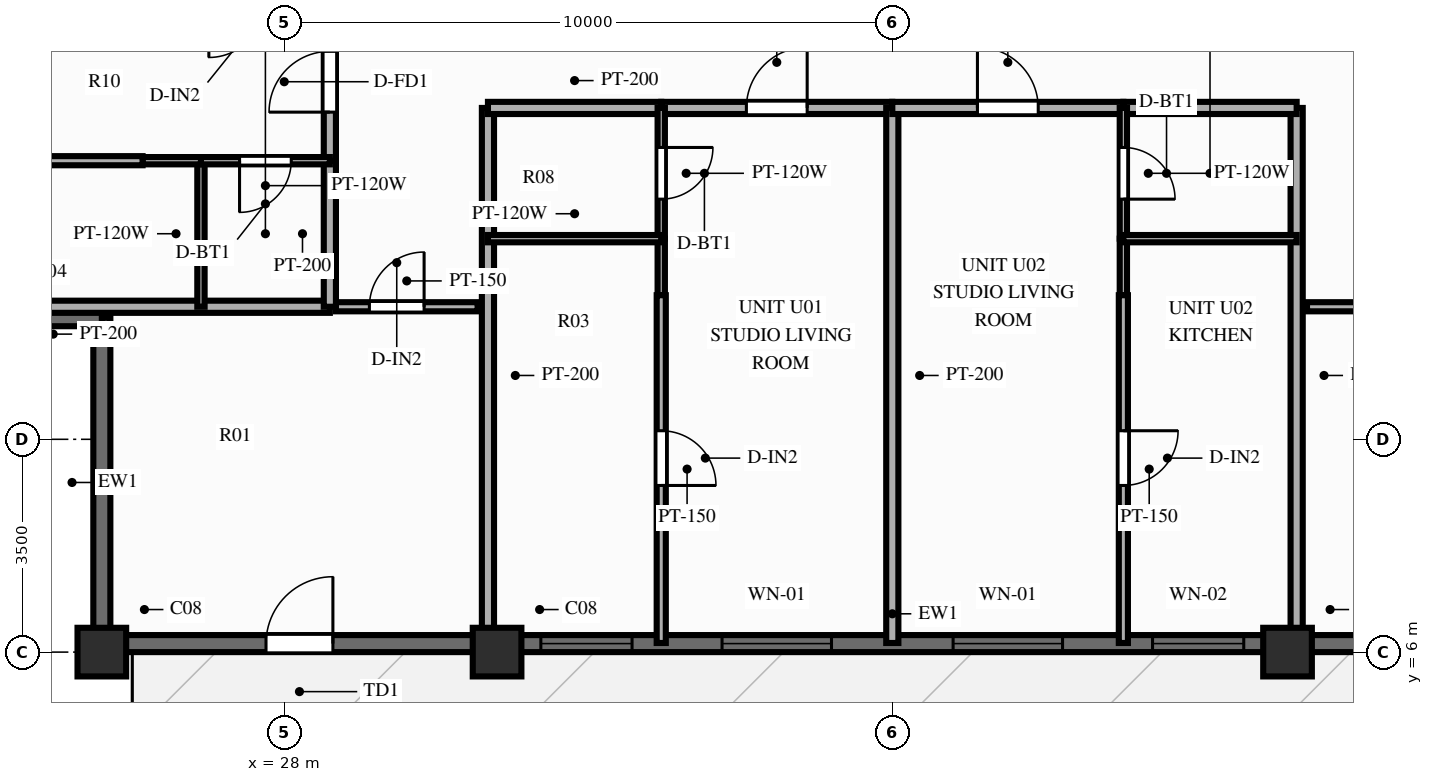
"""IFC4 building model, lengths in metres.
Left out: names, types, materials, properties, quantities, classifications, styles, units other than length and angle.
Written with IfcOpenShell. Run it as: python <this file> out.ifc"""

import sys

from ifc_helpers import new_model, si_unit, direction, frame, frame_2d, origin, origin_2d, place, context, subcontext, project, spatial, rectangle, extrude, source, transform, mapped, element, fill, save


model = new_model("IFC4")
c1 = context("Model", 3, precision=1e-05, world=origin(), true_north=direction((0.0, 1.0)))
c2 = subcontext(c1, "Body", "Model", "MODEL_VIEW")
j1 = project(units=[si_unit("LENGTHUNIT", "METRE"), si_unit("PLANEANGLEUNIT", "RADIAN")], contexts=[c1])
p1 = place(None, origin())
s1 = spatial("IfcSite", under=j1, at=p1, CompositionType="ELEMENT")
p2 = place(p1, origin())
s2 = spatial("IfcBuilding", under=s1, at=p2, CompositionType="ELEMENT")
p3 = place(p2, frame((0.0, 0.0, 202.6)))
s3 = spatial("IfcBuildingStorey", under=s2, at=p3, CompositionType="ELEMENT", Elevation=202.6)
m1 = source(origin(), c2, "Body", "SweptSolid", [
    extrude(rectangle(XDim=0.8, YDim=0.8, at=origin_2d()), origin(), (0.0, 0.0, 1.0), 3.9),
])
for number, where, z_axis, x_axis in (
    (1, (25.0, 6.0, 0.0), (0.0, 0.0, 1.0), (1.0, 0.0, 0.0)),
    (2, (31.5, 6.0, 0.0), (0.0, 0.0, 1.0), (1.0, 0.0, 0.0)),
    (3, (44.5, 6.0, 0.0), (0.0, 0.0, 1.0), (1.0, 0.0, 0.0)),
):
    element("IfcColumn", number, at=place(p3, frame(where, z_axis=z_axis, x_axis=x_axis)), inside=s3, PredefinedType="COLUMN", context=c2, shape_type="MappedRepresentation", body=[
        mapped(m1, transform((0.0, 0.0, 0.0), scale=1.0)),
    ])
p4 = place(p3, frame((25.0, 6.14, 0.0), z_axis=(0.0, 0.0, 1.0), x_axis=(1.0, 0.0, 0.0)))
e4 = element("IfcWall", 4, at=p4, inside=s3, PredefinedType="SOLIDWALL", context=c2, shape_type="SweptSolid", body=[
    extrude(rectangle(XDim=26.0, YDim=0.28, at=frame_2d((13.0, 0.0))), origin(), (0.0, 0.0, 1.0), 2.79),
])
p5 = place(p4, frame((3.8, 0.0, 0.0), z_axis=(0.0, 0.0, 1.0), x_axis=(-1.0, 0.0, 0.0)))
e5 = element("IfcOpeningElement", 5, at=p5, cuts=e4, PredefinedType="OPENING", context=c2, shape_type="SweptSolid", body=[
    extrude(rectangle(XDim=1.1, YDim=2.15, at=frame_2d((0.55, 1.075))), frame((0.0, 0.152, 0.0), z_axis=(0.0, -1.0, 0.0), x_axis=(1.0, 0.0, 0.0)), (0.0, 0.0, 1.0), 0.304),
])
p6 = place(p4, frame((7.22, 0.0, 0.85)))
e6 = element("IfcOpeningElement", 6, at=p6, cuts=e4, PredefinedType="OPENING", context=c2, shape_type="SweptSolid", body=[
    extrude(rectangle(XDim=1.5, YDim=1.65, at=frame_2d((0.75, 0.825))), frame((0.0, 0.152, 0.0), z_axis=(0.0, -1.0, 0.0), x_axis=(1.0, 0.0, 0.0)), (0.0, 0.0, 1.0), 0.304),
])
p7 = place(p4, frame((10.2, 0.0, 0.85)))
e7 = element("IfcOpeningElement", 7, at=p7, cuts=e4, PredefinedType="OPENING", context=c2, shape_type="SweptSolid", body=[
    extrude(rectangle(XDim=1.8, YDim=1.65, at=frame_2d((0.9, 0.825))), frame((0.0, 0.152, 0.0), z_axis=(0.0, -1.0, 0.0), x_axis=(1.0, 0.0, 0.0)), (0.0, 0.0, 1.0), 0.304),
])
p8 = place(p4, frame((14.0, 0.0, 0.85)))
e8 = element("IfcOpeningElement", 8, at=p8, cuts=e4, PredefinedType="OPENING", context=c2, shape_type="SweptSolid", body=[
    extrude(rectangle(XDim=1.8, YDim=1.65, at=frame_2d((0.9, 0.825))), frame((0.0, 0.152, 0.0), z_axis=(0.0, -1.0, 0.0), x_axis=(1.0, 0.0, 0.0)), (0.0, 0.0, 1.0), 0.304),
])
p9 = place(p4, frame((17.28, 0.0, 0.85)))
e9 = element("IfcOpeningElement", 9, at=p9, cuts=e4, PredefinedType="OPENING", context=c2, shape_type="SweptSolid", body=[
    extrude(rectangle(XDim=1.5, YDim=1.65, at=frame_2d((0.75, 0.825))), frame((0.0, 0.152, 0.0), z_axis=(0.0, -1.0, 0.0), x_axis=(1.0, 0.0, 0.0)), (0.0, 0.0, 1.0), 0.304),
])
p10 = place(p4, frame((21.85, 0.0, 0.85)))
e10 = element("IfcOpeningElement", 10, at=p10, cuts=e4, PredefinedType="OPENING", context=c2, shape_type="SweptSolid", body=[
    extrude(rectangle(XDim=1.8, YDim=1.65, at=frame_2d((0.9, 0.825))), frame((0.0, 0.152, 0.0), z_axis=(0.0, -1.0, 0.0), x_axis=(1.0, 0.0, 0.0)), (0.0, 0.0, 1.0), 0.304),
])
for number, where, z_axis, x_axis in (
    (11, (25.0, 6.08, 0.0), (0.0, 0.0, 1.0), (0.0, 1.0, 0.0)),
    (12, (19.58, 11.5, 0.0), (0.0, 0.0, 1.0), (1.0, 0.0, 0.0)),
):
    element("IfcWall", number, at=place(p3, frame(where, z_axis=z_axis, x_axis=x_axis)), inside=s3, PredefinedType="SOLIDWALL", context=c2, shape_type="SweptSolid", body=[
        extrude(rectangle(XDim=5.42, YDim=0.28, at=frame_2d((2.71, 0.0))), origin(), (0.0, 0.0, 1.0), 2.79),
    ])
p11 = place(p3, frame((28.85, 11.68, 0.0), z_axis=(0.0, 0.0, 1.0), x_axis=(1.0, 0.0, 0.0)))
e13 = element("IfcWall", 13, at=p11, inside=s3, PredefinedType="PARTITIONING", context=c2, shape_type="SweptSolid", body=[
    extrude(rectangle(XDim=2.33, YDim=0.15, at=frame_2d((1.165, 0.0))), origin(), (0.0, 0.0, 1.0), 3.6),
])
p12 = place(p11, frame((0.55, 0.0, 0.0)))
e14 = element("IfcOpeningElement", 14, at=p12, cuts=e13, PredefinedType="OPENING", context=c2, shape_type="SweptSolid", body=[
    extrude(rectangle(XDim=0.9, YDim=2.1, at=frame_2d((0.45, 1.05))), frame((0.0, 0.087, 0.0), z_axis=(0.0, -1.0, 0.0), x_axis=(1.0, 0.0, 0.0)), (0.0, 0.0, 1.0), 0.174),
])
p13 = place(p3, frame((44.82, 11.68, 0.0), z_axis=(0.0, 0.0, 1.0), x_axis=(1.0, 0.0, 0.0)))
e15 = element("IfcWall", 15, at=p13, inside=s3, PredefinedType="PARTITIONING", context=c2, shape_type="SweptSolid", body=[
    extrude(rectangle(XDim=2.33, YDim=0.15, at=frame_2d((1.165, 0.0))), origin(), (0.0, 0.0, 1.0), 3.6),
])
p14 = place(p13, frame((0.88, 0.0, 0.0)))
e16 = element("IfcOpeningElement", 16, at=p14, cuts=e15, PredefinedType="OPENING", context=c2, shape_type="SweptSolid", body=[
    extrude(rectangle(XDim=0.9, YDim=2.1, at=frame_2d((0.45, 1.05))), frame((0.0, 0.087, 0.0), z_axis=(0.0, -1.0, 0.0), x_axis=(1.0, 0.0, 0.0)), (0.0, 0.0, 1.0), 0.174),
])
for number, where, z_axis, x_axis in (
    (17, (31.35, 14.95, 0.0), (0.0, 0.0, 1.0), (0.0, -1.0, 0.0)),
    (18, (44.65, 14.95, 0.0), (0.0, 0.0, 1.0), (0.0, -1.0, 0.0)),
):
    element("IfcWall", number, at=place(p3, frame(where, z_axis=z_axis, x_axis=x_axis)), inside=s3, PredefinedType="PARTITIONING", context=c2, shape_type="SweptSolid", body=[
        extrude(rectangle(XDim=8.8, YDim=0.2, at=frame_2d((4.4, 0.0))), origin(), (0.0, 0.0, 1.0), 2.79),
    ])
p15 = place(p3, frame((31.35, 14.95, 0.0), z_axis=(0.0, 0.0, 1.0), x_axis=(1.0, 0.0, 0.0)))
e19 = element("IfcWall", 19, at=p15, inside=s3, PredefinedType="PARTITIONING", context=c2, shape_type="SweptSolid", body=[
    extrude(rectangle(XDim=2.85, YDim=0.2, at=frame_2d((1.425, 0.0))), origin(), (0.0, 0.0, 1.0), 3.6),
])
p16 = place(p3, frame((34.2, 14.95, 0.0), z_axis=(0.0, 0.0, 1.0), x_axis=(1.0, 0.0, 0.0)))
e20 = element("IfcWall", 20, at=p16, inside=s3, PredefinedType="PARTITIONING", context=c2, shape_type="SweptSolid", body=[
    extrude(rectangle(XDim=3.8, YDim=0.2, at=frame_2d((1.9, 0.0))), origin(), (0.0, 0.0, 1.0), 3.6),
])
p17 = place(p16, frame((1.4, 0.0, 0.0)))
e21 = element("IfcOpeningElement", 21, at=p17, cuts=e20, PredefinedType="OPENING", context=c2, shape_type="SweptSolid", body=[
    extrude(rectangle(XDim=1.0, YDim=2.15, at=frame_2d((0.5, 1.075))), frame((0.0, 0.112, 0.0), z_axis=(0.0, -1.0, 0.0), x_axis=(1.0, 0.0, 0.0)), (0.0, 0.0, 1.0), 0.224),
])
p18 = place(p3, frame((34.2, 14.95, 0.0), z_axis=(0.0, 0.0, 1.0), x_axis=(0.0, -1.0, 0.0)))
e22 = element("IfcWall", 22, at=p18, inside=s3, PredefinedType="PARTITIONING", context=c2, shape_type="SweptSolid", body=[
    extrude(rectangle(XDim=2.15, YDim=0.12, at=frame_2d((1.075, 0.0))), origin(), (0.0, 0.0, 1.0), 3.6),
])
p19 = place(p18, frame((0.65, 0.0, 0.0)))
e23 = element("IfcOpeningElement", 23, at=p19, cuts=e22, PredefinedType="OPENING", context=c2, shape_type="SweptSolid", body=[
    extrude(rectangle(XDim=0.85, YDim=2.05, at=frame_2d((0.425, 1.025))), frame((0.0, 0.072, 0.0), z_axis=(0.0, -1.0, 0.0), x_axis=(1.0, 0.0, 0.0)), (0.0, 0.0, 1.0), 0.144),
])
p20 = place(p3, frame((34.2, 12.8, 0.0), z_axis=(0.0, 0.0, 1.0), x_axis=(0.0, -1.0, 0.0)))
e24 = element("IfcWall", 24, at=p20, inside=s3, PredefinedType="PARTITIONING", context=c2, shape_type="SweptSolid", body=[
    extrude(rectangle(XDim=0.93, YDim=0.12, at=frame_2d((0.465, 0.0))), origin(), (0.0, 0.0, 1.0), 3.6),
])
p21 = place(p3, frame((31.35, 12.8, 0.0), z_axis=(0.0, 0.0, 1.0), x_axis=(1.0, 0.0, 0.0)))
e25 = element("IfcWall", 25, at=p21, inside=s3, PredefinedType="PARTITIONING", context=c2, shape_type="SweptSolid", body=[
    extrude(rectangle(XDim=2.85, YDim=0.12, at=frame_2d((1.425, 0.0))), origin(), (0.0, 0.0, 1.0), 3.6),
])
p22 = place(p3, frame((34.2, 11.87, 0.0), z_axis=(0.0, 0.0, 1.0), x_axis=(0.0, -1.0, 0.0)))
e26 = element("IfcWall", 26, at=p22, inside=s3, PredefinedType="PARTITIONING", context=c2, shape_type="SweptSolid", body=[
    extrude(rectangle(XDim=5.72, YDim=0.15, at=frame_2d((2.86, 0.0))), origin(), (0.0, 0.0, 1.0), 3.6),
])
p23 = place(p22, frame((2.229, 0.0, 0.0)))
e27 = element("IfcOpeningElement", 27, at=p23, cuts=e26, PredefinedType="OPENING", context=c2, shape_type="SweptSolid", body=[
    extrude(rectangle(XDim=0.9, YDim=2.1, at=frame_2d((0.45, 1.05))), frame((0.0, 0.087, 0.0), z_axis=(0.0, -1.0, 0.0), x_axis=(1.0, 0.0, 0.0)), (0.0, 0.0, 1.0), 0.174),
])
p24 = place(p3, frame((38.0, 14.95, 0.0), z_axis=(0.0, 0.0, 1.0), x_axis=(0.0, -1.0, 0.0)))
e28 = element("IfcWall", 28, at=p24, inside=s3, PredefinedType="PARTITIONING", context=c2, shape_type="SweptSolid", body=[
    extrude(rectangle(XDim=8.8, YDim=0.2, at=frame_2d((4.4, 0.0))), origin(), (0.0, 0.0, 1.0), 3.6),
])
p25 = place(p3, frame((38.0, 14.95, 0.0), z_axis=(0.0, 0.0, 1.0), x_axis=(1.0, 0.0, 0.0)))
e29 = element("IfcWall", 29, at=p25, inside=s3, PredefinedType="PARTITIONING", context=c2, shape_type="SweptSolid", body=[
    extrude(rectangle(XDim=3.8, YDim=0.2, at=frame_2d((1.9, 0.0))), origin(), (0.0, 0.0, 1.0), 3.6),
])
p26 = place(p25, frame((1.4, 0.0, 0.0)))
e30 = element("IfcOpeningElement", 30, at=p26, cuts=e29, PredefinedType="OPENING", context=c2, shape_type="SweptSolid", body=[
    extrude(rectangle(XDim=1.0, YDim=2.15, at=frame_2d((0.5, 1.075))), frame((0.0, 0.112, 0.0), z_axis=(0.0, -1.0, 0.0), x_axis=(1.0, 0.0, 0.0)), (0.0, 0.0, 1.0), 0.224),
])
p27 = place(p3, frame((41.8, 14.95, 0.0), z_axis=(0.0, 0.0, 1.0), x_axis=(1.0, 0.0, 0.0)))
e31 = element("IfcWall", 31, at=p27, inside=s3, PredefinedType="PARTITIONING", context=c2, shape_type="SweptSolid", body=[
    extrude(rectangle(XDim=2.85, YDim=0.2, at=frame_2d((1.425, 0.0))), origin(), (0.0, 0.0, 1.0), 3.6),
])
p28 = place(p3, frame((41.8, 14.95, 0.0), z_axis=(0.0, 0.0, 1.0), x_axis=(0.0, -1.0, 0.0)))
e32 = element("IfcWall", 32, at=p28, inside=s3, PredefinedType="PARTITIONING", context=c2, shape_type="SweptSolid", body=[
    extrude(rectangle(XDim=2.15, YDim=0.12, at=frame_2d((1.075, 0.0))), origin(), (0.0, 0.0, 1.0), 3.6),
])
p29 = place(p28, frame((0.65, 0.0, 0.0)))
e33 = element("IfcOpeningElement", 33, at=p29, cuts=e32, PredefinedType="OPENING", context=c2, shape_type="SweptSolid", body=[
    extrude(rectangle(XDim=0.85, YDim=2.05, at=frame_2d((0.425, 1.025))), frame((0.0, 0.072, 0.0), z_axis=(0.0, -1.0, 0.0), x_axis=(1.0, 0.0, 0.0)), (0.0, 0.0, 1.0), 0.144),
])
p30 = place(p3, frame((41.8, 12.8, 0.0), z_axis=(0.0, 0.0, 1.0), x_axis=(0.0, -1.0, 0.0)))
e34 = element("IfcWall", 34, at=p30, inside=s3, PredefinedType="PARTITIONING", context=c2, shape_type="SweptSolid", body=[
    extrude(rectangle(XDim=0.93, YDim=0.12, at=frame_2d((0.465, 0.0))), origin(), (0.0, 0.0, 1.0), 3.6),
])
p31 = place(p3, frame((41.8, 12.8, 0.0), z_axis=(0.0, 0.0, 1.0), x_axis=(1.0, 0.0, 0.0)))
e35 = element("IfcWall", 35, at=p31, inside=s3, PredefinedType="PARTITIONING", context=c2, shape_type="SweptSolid", body=[
    extrude(rectangle(XDim=2.85, YDim=0.12, at=frame_2d((1.425, 0.0))), origin(), (0.0, 0.0, 1.0), 3.6),
])
p32 = place(p3, frame((41.8, 11.87, 0.0), z_axis=(0.0, 0.0, 1.0), x_axis=(0.0, -1.0, 0.0)))
e36 = element("IfcWall", 36, at=p32, inside=s3, PredefinedType="PARTITIONING", context=c2, shape_type="SweptSolid", body=[
    extrude(rectangle(XDim=5.72, YDim=0.15, at=frame_2d((2.86, 0.0))), origin(), (0.0, 0.0, 1.0), 3.6),
])
p33 = place(p32, frame((2.229, 0.0, 0.0)))
e37 = element("IfcOpeningElement", 37, at=p33, cuts=e36, PredefinedType="OPENING", context=c2, shape_type="SweptSolid", body=[
    extrude(rectangle(XDim=0.9, YDim=2.1, at=frame_2d((0.45, 1.05))), frame((0.0, 0.087, 0.0), z_axis=(0.0, -1.0, 0.0), x_axis=(1.0, 0.0, 0.0)), (0.0, 0.0, 1.0), 0.174),
])
p34 = place(p3, frame((28.75, 11.68, 0.0), z_axis=(0.0, 0.0, 1.0), x_axis=(-1.0, 0.0, 0.0)))
e38 = element("IfcWall", 38, at=p34, inside=s3, PredefinedType="PARTITIONING", context=c2, shape_type="SweptSolid", body=[
    extrude(rectangle(XDim=9.1, YDim=0.2, at=frame_2d((4.55, 0.0))), origin(), (0.0, 0.0, 1.0), 3.6),
])
p35 = place(p3, frame((28.75, 11.68, 0.0), z_axis=(0.0, 0.0, 1.0), x_axis=(0.0, 1.0, 0.0)))
e39 = element("IfcWall", 39, at=p35, inside=s3, PredefinedType="PARTITIONING", context=c2, shape_type="SweptSolid", body=[
    extrude(rectangle(XDim=2.402, YDim=0.2, at=frame_2d((1.201, 0.0))), origin(), (0.0, 0.0, 1.0), 3.6),
])
p36 = place(p3, frame((28.75, 14.082, 0.0), z_axis=(0.0, 0.0, 1.0), x_axis=(0.0, 1.0, 0.0)))
e40 = element("IfcWall", 40, at=p36, inside=s3, PredefinedType="PARTITIONING", context=c2, shape_type="SweptSolid", body=[
    extrude(rectangle(XDim=2.598, YDim=0.2, at=frame_2d((1.299, 0.0))), origin(), (0.0, 0.0, 1.0), 3.6),
])
p37 = place(p36, frame((0.799, 0.0, 0.0)))
e41 = element("IfcOpeningElement", 41, at=p37, cuts=e40, PredefinedType="OPENING", context=c2, shape_type="SweptSolid", body=[
    extrude(rectangle(XDim=1.0, YDim=2.15, at=frame_2d((0.5, 1.075))), frame((0.0, 0.112, 0.0), z_axis=(0.0, -1.0, 0.0), x_axis=(1.0, 0.0, 0.0)), (0.0, 0.0, 1.0), 0.224),
])
p38 = place(p3, frame((26.63, 11.68, 0.0), z_axis=(0.0, 0.0, 1.0), x_axis=(0.0, 1.0, 0.0)))
e42 = element("IfcWall", 42, at=p38, inside=s3, PredefinedType="PARTITIONING", context=c2, shape_type="SweptSolid", body=[
    extrude(rectangle(XDim=2.402, YDim=0.12, at=frame_2d((1.201, 0.0))), origin(), (0.0, 0.0, 1.0), 3.6),
])
p39 = place(p3, frame((28.75, 14.082, 0.0), z_axis=(0.0, 0.0, 1.0), x_axis=(-1.0, 0.0, 0.0)))
e43 = element("IfcWall", 43, at=p39, inside=s3, PredefinedType="PARTITIONING", context=c2, shape_type="SweptSolid", body=[
    extrude(rectangle(XDim=2.12, YDim=0.12, at=frame_2d((1.06, 0.0))), origin(), (0.0, 0.0, 1.0), 3.6),
])
p40 = place(p39, frame((0.635, 0.0, 0.0)))
e44 = element("IfcOpeningElement", 44, at=p40, cuts=e43, PredefinedType="OPENING", context=c2, shape_type="SweptSolid", body=[
    extrude(rectangle(XDim=0.85, YDim=2.05, at=frame_2d((0.425, 1.025))), frame((0.0, 0.072, 0.0), z_axis=(0.0, -1.0, 0.0), x_axis=(1.0, 0.0, 0.0)), (0.0, 0.0, 1.0), 0.144),
])
p41 = place(p3, frame((26.63, 14.082, 0.0), z_axis=(0.0, 0.0, 1.0), x_axis=(-1.0, 0.0, 0.0)))
e45 = element("IfcWall", 45, at=p41, inside=s3, PredefinedType="PARTITIONING", context=c2, shape_type="SweptSolid", body=[
    extrude(rectangle(XDim=0.96, YDim=0.12, at=frame_2d((0.48, 0.0))), origin(), (0.0, 0.0, 1.0), 3.6),
])
p42 = place(p3, frame((25.67, 14.082, 0.0), z_axis=(0.0, 0.0, 1.0), x_axis=(-1.0, 0.0, 0.0)))
e46 = element("IfcWall", 46, at=p42, inside=s3, PredefinedType="PARTITIONING", context=c2, shape_type="SweptSolid", body=[
    extrude(rectangle(XDim=6.02, YDim=0.15, at=frame_2d((3.01, 0.0))), origin(), (0.0, 0.0, 1.0), 3.6),
])
p43 = place(p42, frame((2.367, 0.0, 0.0)))
e47 = element("IfcOpeningElement", 47, at=p43, cuts=e46, PredefinedType="OPENING", context=c2, shape_type="SweptSolid", body=[
    extrude(rectangle(XDim=0.9, YDim=2.1, at=frame_2d((0.45, 1.05))), frame((0.0, 0.087, 0.0), z_axis=(0.0, -1.0, 0.0), x_axis=(1.0, 0.0, 0.0)), (0.0, 0.0, 1.0), 0.174),
])
m2 = source(origin(), c2, "Body", "SweptSolid", [
    extrude(rectangle(XDim=1.1, YDim=2.15, at=frame_2d((0.55, 1.075))), frame((0.0, 0.025, 0.0), z_axis=(0.0, -1.0, 0.0), x_axis=(1.0, 0.0, 0.0)), (0.0, 0.0, 1.0), 0.05),
])
p44 = place(p5, origin())
e48 = element("IfcDoor", 48, at=p44, inside=s3, OperationType="SINGLE_SWING_LEFT", PredefinedType="DOOR", context=c2, shape_type="MappedRepresentation", body=[
    mapped(m2, transform((0.0, 0.0, 0.0), scale=1.0)),
])
fill(e5, e48)
m3 = source(origin(), c2, "Body", "SweptSolid", [
    extrude(rectangle(XDim=1.5, YDim=1.65, at=frame_2d((0.75, 0.825))), frame((0.0, 0.03, 0.0), z_axis=(0.0, -1.0, 0.0), x_axis=(1.0, 0.0, 0.0)), (0.0, 0.0, 1.0), 0.06),
])
p45 = place(p6, origin())
e49 = element("IfcWindow", 49, at=p45, inside=s3, PartitioningType="SINGLE_PANEL", PredefinedType="WINDOW", context=c2, shape_type="MappedRepresentation", body=[
    mapped(m3, transform((0.0, 0.0, 0.0), scale=1.0)),
])
fill(e6, e49)
m4 = source(origin(), c2, "Body", "SweptSolid", [
    extrude(rectangle(XDim=1.8, YDim=1.65, at=frame_2d((0.9, 0.825))), frame((0.0, 0.03, 0.0), z_axis=(0.0, -1.0, 0.0), x_axis=(1.0, 0.0, 0.0)), (0.0, 0.0, 1.0), 0.06),
])
p46 = place(p7, origin())
e50 = element("IfcWindow", 50, at=p46, inside=s3, PartitioningType="SINGLE_PANEL", PredefinedType="WINDOW", context=c2, shape_type="MappedRepresentation", body=[
    mapped(m4, transform((0.0, 0.0, 0.0), scale=1.0)),
])
fill(e7, e50)
p47 = place(p8, origin())
e51 = element("IfcWindow", 51, at=p47, inside=s3, PartitioningType="SINGLE_PANEL", PredefinedType="WINDOW", context=c2, shape_type="MappedRepresentation", body=[
    mapped(m4, transform((0.0, 0.0, 0.0), scale=1.0)),
])
fill(e8, e51)
p48 = place(p9, origin())
e52 = element("IfcWindow", 52, at=p48, inside=s3, PartitioningType="SINGLE_PANEL", PredefinedType="WINDOW", context=c2, shape_type="MappedRepresentation", body=[
    mapped(m3, transform((0.0, 0.0, 0.0), scale=1.0)),
])
fill(e9, e52)
m5 = source(origin(), c2, "Body", "SweptSolid", [
    extrude(rectangle(XDim=0.9, YDim=2.1, at=frame_2d((0.45, 1.05))), frame((0.0, 0.025, 0.0), z_axis=(0.0, -1.0, 0.0), x_axis=(1.0, 0.0, 0.0)), (0.0, 0.0, 1.0), 0.05),
])
p49 = place(p12, origin())
e53 = element("IfcDoor", 53, at=p49, inside=s3, OperationType="SINGLE_SWING_RIGHT", PredefinedType="DOOR", context=c2, shape_type="MappedRepresentation", body=[
    mapped(m5, transform((0.0, 0.0, 0.0), scale=1.0)),
])
fill(e14, e53)
m6 = source(origin(), c2, "Body", "SweptSolid", [
    extrude(rectangle(XDim=1.0, YDim=2.15, at=frame_2d((0.5, 1.075))), frame((0.0, 0.025, 0.0), z_axis=(0.0, -1.0, 0.0), x_axis=(1.0, 0.0, 0.0)), (0.0, 0.0, 1.0), 0.05),
])
p50 = place(p17, origin())
e54 = element("IfcDoor", 54, at=p50, inside=s3, OperationType="SINGLE_SWING_RIGHT", PredefinedType="DOOR", context=c2, shape_type="MappedRepresentation", body=[
    mapped(m6, transform((0.0, 0.0, 0.0), scale=1.0)),
])
fill(e21, e54)
m7 = source(origin(), c2, "Body", "SweptSolid", [
    extrude(rectangle(XDim=0.85, YDim=2.05, at=frame_2d((0.425, 1.025))), frame((0.0, 0.025, 0.0), z_axis=(0.0, -1.0, 0.0), x_axis=(1.0, 0.0, 0.0)), (0.0, 0.0, 1.0), 0.05),
])
p51 = place(p19, origin())
e55 = element("IfcDoor", 55, at=p51, inside=s3, OperationType="SINGLE_SWING_LEFT", PredefinedType="DOOR", context=c2, shape_type="MappedRepresentation", body=[
    mapped(m7, transform((0.0, 0.0, 0.0), scale=1.0)),
])
fill(e23, e55)
p52 = place(p23, origin())
e56 = element("IfcDoor", 56, at=p52, inside=s3, OperationType="SINGLE_SWING_RIGHT", PredefinedType="DOOR", context=c2, shape_type="MappedRepresentation", body=[
    mapped(m5, transform((0.0, 0.0, 0.0), scale=1.0)),
])
fill(e27, e56)
p53 = place(p26, origin())
e57 = element("IfcDoor", 57, at=p53, inside=s3, OperationType="SINGLE_SWING_LEFT", PredefinedType="DOOR", context=c2, shape_type="MappedRepresentation", body=[
    mapped(m6, transform((0.0, 0.0, 0.0), scale=1.0)),
])
fill(e30, e57)
p54 = place(p29, origin())
e58 = element("IfcDoor", 58, at=p54, inside=s3, OperationType="SINGLE_SWING_RIGHT", PredefinedType="DOOR", context=c2, shape_type="MappedRepresentation", body=[
    mapped(m7, transform((0.0, 0.0, 0.0), scale=1.0)),
])
fill(e33, e58)
p55 = place(p33, origin())
e59 = element("IfcDoor", 59, at=p55, inside=s3, OperationType="SINGLE_SWING_LEFT", PredefinedType="DOOR", context=c2, shape_type="MappedRepresentation", body=[
    mapped(m5, transform((0.0, 0.0, 0.0), scale=1.0)),
])
fill(e37, e59)
p56 = place(p37, origin())
e60 = element("IfcDoor", 60, at=p56, inside=s3, OperationType="SINGLE_SWING_LEFT", PredefinedType="DOOR", context=c2, shape_type="MappedRepresentation", body=[
    mapped(m6, transform((0.0, 0.0, 0.0), scale=1.0)),
])
fill(e41, e60)
p57 = place(p40, origin())
e61 = element("IfcDoor", 61, at=p57, inside=s3, OperationType="SINGLE_SWING_RIGHT", PredefinedType="DOOR", context=c2, shape_type="MappedRepresentation", body=[
    mapped(m7, transform((0.0, 0.0, 0.0), scale=1.0)),
])
fill(e44, e61)
save(model, sys.argv[1])
